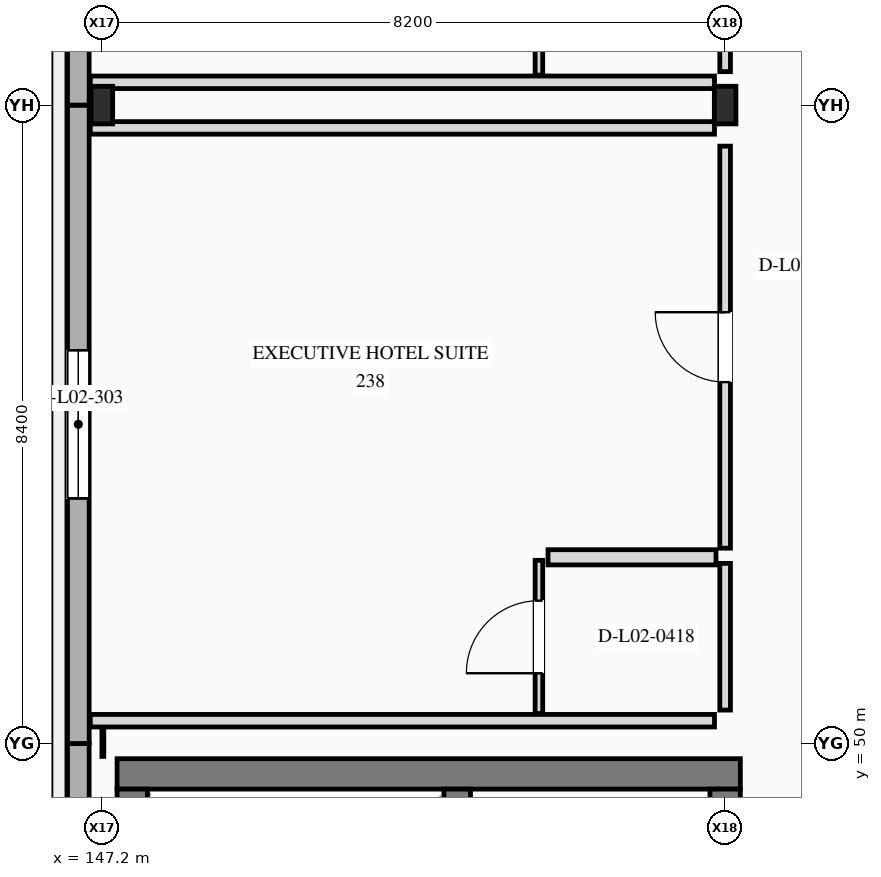
"""IFC4 building model, lengths in metres.
Left out: names, types, materials, properties, quantities, classifications, styles, units other than length and angle.
Written with IfcOpenShell. Run it as: python <this file> out.ifc"""

import sys

from ifc_helpers import new_model, si_unit, direction, frame, frame_2d, origin, origin_2d, place, context, subcontext, project, spatial, rectangle, i_section, extrude, element, fill, save


model = new_model("IFC4")
c1 = context("Model", 3, precision=1e-05, world=origin(), true_north=direction((0.0, 1.0)))
c2 = subcontext(c1, "Body", "Model", "MODEL_VIEW")
j1 = project(units=[si_unit("LENGTHUNIT", "METRE"), si_unit("PLANEANGLEUNIT", "RADIAN")], contexts=[c1])
p1 = place(None, origin())
s1 = spatial("IfcSite", under=j1, at=p1, CompositionType="ELEMENT")
p2 = place(p1, origin())
s2 = spatial("IfcBuilding", under=s1, at=p2, CompositionType="ELEMENT")
p3 = place(p2, frame((0.0, 0.0, 10.8)))
s3 = spatial("IfcBuildingStorey", under=s2, at=p3, CompositionType="ELEMENT", Elevation=10.8)
for number, where, z_axis, x_axis in (
    (1, (147.2, 58.4, 0.0), (0.0, 0.0, 1.0), (1.0, 0.0, 0.0)),
    (2, (155.4, 58.4, 0.0), (0.0, 0.0, 1.0), (1.0, 0.0, 0.0)),
):
    element("IfcColumn", number, at=place(p3, frame(where, z_axis=z_axis, x_axis=x_axis)), inside=s3, PredefinedType="COLUMN", context=c2, shape_type="SweptSolid", body=[
        extrude(i_section(OverallWidth=0.284, OverallDepth=0.495, WebThickness=0.019, FlangeThickness=0.033, at=origin_2d()), origin(), (0.0, 0.0, 1.0), 4.8),
    ])
p4 = place(p3, frame((146.89, 41.6, 0.0), z_axis=(0.0, 0.0, 1.0), x_axis=(0.0, 1.0, 0.0)))
e3 = element("IfcWall", 3, at=p4, inside=s3, PredefinedType="STANDARD", context=c2, shape_type="SweptSolid", body=[
    extrude(rectangle(XDim=8.4, YDim=0.285, at=frame_2d((4.2, 0.0))), origin(), (0.0, 0.0, 1.0), 4.8),
])
p5 = place(p3, frame((146.89, 50.0, 0.0), z_axis=(0.0, 0.0, 1.0), x_axis=(0.0, 1.0, 0.0)))
e4 = element("IfcWall", 4, at=p5, inside=s3, PredefinedType="STANDARD", context=c2, shape_type="SweptSolid", body=[
    extrude(rectangle(XDim=8.4, YDim=0.285, at=frame_2d((4.2, 0.0))), origin(), (0.0, 0.0, 1.0), 4.8),
])
p6 = place(p5, frame((3.225, 0.0, 0.85)))
e5 = element("IfcOpeningElement", 5, at=p6, cuts=e4, PredefinedType="OPENING", context=c2, shape_type="SweptSolid", body=[
    extrude(rectangle(XDim=1.95, YDim=1.85, at=frame_2d((0.975, 0.925))), frame((0.0, 0.152, 0.0), z_axis=(0.0, -1.0, 0.0), x_axis=(1.0, 0.0, 0.0)), (0.0, 0.0, 1.0), 0.305),
])
p7 = place(p3, frame((146.89, 58.4, 0.0), z_axis=(0.0, 0.0, 1.0), x_axis=(0.0, 1.0, 0.0)))
e6 = element("IfcWall", 6, at=p7, inside=s3, PredefinedType="STANDARD", context=c2, shape_type="SweptSolid", body=[
    extrude(rectangle(XDim=8.71, YDim=0.285, at=frame_2d((4.355, 0.0))), origin(), (0.0, 0.0, 1.0), 4.8),
])
p8 = place(p7, frame((3.2, 0.0, 0.85)))
e7 = element("IfcOpeningElement", 7, at=p8, cuts=e6, PredefinedType="OPENING", context=c2, shape_type="SweptSolid", body=[
    extrude(rectangle(XDim=2.0, YDim=1.65, at=frame_2d((1.0, 0.825))), frame((0.0, 0.152, 0.0), z_axis=(0.0, -1.0, 0.0), x_axis=(1.0, 0.0, 0.0)), (0.0, 0.0, 1.0), 0.305),
])
p9 = place(p3, frame((155.6, 49.6, 0.0), z_axis=(0.0, 0.0, 1.0), x_axis=(-1.0, 0.0, 0.0)))
e8 = element("IfcWall", 8, at=p9, inside=s3, PredefinedType="SHEAR", context=c2, shape_type="SweptSolid", body=[
    extrude(rectangle(XDim=8.2, YDim=0.4, at=frame_2d((4.1, 0.0))), origin(), (0.0, 0.0, 1.0), 4.8),
])
p10 = place(p3, frame((147.6, 49.4, 0.0), z_axis=(0.0, 0.0, 1.0), x_axis=(0.0, -1.0, 0.0)))
e9 = element("IfcWall", 9, at=p10, inside=s3, PredefinedType="SHEAR", context=c2, shape_type="SweptSolid", body=[
    extrude(rectangle(XDim=9.4, YDim=0.4, at=frame_2d((4.7, 0.0))), origin(), (0.0, 0.0, 1.0), 4.8),
])
p11 = place(p3, frame((155.4, 40.0, 0.0), z_axis=(0.0, 0.0, 1.0), x_axis=(0.0, 1.0, 0.0)))
e10 = element("IfcWall", 10, at=p11, inside=s3, PredefinedType="SHEAR", context=c2, shape_type="SweptSolid", body=[
    extrude(rectangle(XDim=9.4, YDim=0.4, at=frame_2d((4.7, 0.0))), origin(), (0.0, 0.0, 1.0), 4.8),
])
p12 = place(p11, frame((1.05, 0.0, 0.0)))
e11 = element("IfcOpeningElement", 11, at=p12, cuts=e10, PredefinedType="OPENING", context=c2, shape_type="SweptSolid", body=[
    extrude(rectangle(XDim=1.1, YDim=2.2, at=frame_2d((0.55, 1.1))), frame((0.0, 0.21, 0.0), z_axis=(0.0, -1.0, 0.0), x_axis=(1.0, 0.0, 0.0)), (0.0, 0.0, 1.0), 0.42),
])
p13 = place(p11, frame((3.95, 0.0, 0.0)))
e12 = element("IfcOpeningElement", 12, at=p13, cuts=e10, PredefinedType="OPENING", context=c2, shape_type="SweptSolid", body=[
    extrude(rectangle(XDim=1.1, YDim=2.2, at=frame_2d((0.55, 1.1))), frame((0.0, 0.21, 0.0), z_axis=(0.0, -1.0, 0.0), x_axis=(1.0, 0.0, 0.0)), (0.0, 0.0, 1.0), 0.42),
])
p14 = place(p11, frame((6.875, 0.0, 0.0)))
e13 = element("IfcOpeningElement", 13, at=p14, cuts=e10, PredefinedType="OPENING", context=c2, shape_type="SweptSolid", body=[
    extrude(rectangle(XDim=1.35, YDim=2.3, at=frame_2d((0.675, 1.15))), frame((0.0, 0.21, 0.0), z_axis=(0.0, -1.0, 0.0), x_axis=(1.0, 0.0, 0.0)), (0.0, 0.0, 1.0), 0.42),
])
p15 = place(p3, frame((151.875, 40.0, 0.0), z_axis=(0.0, 0.0, 1.0), x_axis=(0.0, 1.0, 0.0)))
e14 = element("IfcWall", 14, at=p15, inside=s3, PredefinedType="SHEAR", context=c2, shape_type="SweptSolid", body=[
    extrude(rectangle(XDim=9.4, YDim=0.35, at=frame_2d((4.7, 0.0))), origin(), (0.0, 0.0, 1.0), 4.8),
])
p16 = place(p3, frame((155.4, 50.44, 0.0), z_axis=(0.0, 0.0, 1.0), x_axis=(0.0, 1.0, 0.0)))
e15 = element("IfcWall", 15, at=p16, inside=s3, PredefinedType="PARTITIONING", context=c2, shape_type="SweptSolid", body=[
    extrude(rectangle(XDim=1.93, YDim=0.14, at=frame_2d((0.965, 0.0))), origin(), (0.0, 0.0, 1.0), 3.865),
])
p17 = place(p3, frame((155.4, 52.57, 0.0), z_axis=(0.0, 0.0, 1.0), x_axis=(0.0, 1.0, 0.0)))
e16 = element("IfcWall", 16, at=p17, inside=s3, PredefinedType="PARTITIONING", context=c2, shape_type="SweptSolid", body=[
    extrude(rectangle(XDim=5.29, YDim=0.14, at=frame_2d((2.645, 0.0))), origin(), (0.0, 0.0, 1.0), 3.865),
])
p18 = place(p17, frame((2.185, 0.0, 0.0)))
e17 = element("IfcOpeningElement", 17, at=p18, cuts=e16, PredefinedType="OPENING", context=c2, shape_type="SweptSolid", body=[
    extrude(rectangle(XDim=0.92, YDim=2.3, at=frame_2d((0.46, 1.15))), frame((0.0, 0.08, 0.0), z_axis=(0.0, -1.0, 0.0), x_axis=(1.0, 0.0, 0.0)), (0.0, 0.0, 1.0), 0.16),
])
p19 = place(p3, frame((147.048, 50.3, 0.0), z_axis=(0.0, 0.0, 1.0), x_axis=(1.0, 0.0, 0.0)))
e18 = element("IfcWall", 18, at=p19, inside=s3, PredefinedType="PARTITIONING", context=c2, shape_type="SweptSolid", body=[
    extrude(rectangle(XDim=8.212, YDim=0.165, at=frame_2d((4.106, 0.0))), origin(), (0.0, 0.0, 1.0), 4.475),
])
p20 = place(p3, frame((147.048, 58.1, 0.0), z_axis=(0.0, 0.0, 1.0), x_axis=(1.0, 0.0, 0.0)))
e19 = element("IfcWall", 19, at=p20, inside=s3, PredefinedType="PARTITIONING", context=c2, shape_type="SweptSolid", body=[
    extrude(rectangle(XDim=8.212, YDim=0.165, at=frame_2d((4.106, 0.0))), origin(), (0.0, 0.0, 1.0), 3.888),
])
p21 = place(p3, frame((153.07, 52.45, 0.0), z_axis=(0.0, 0.0, 1.0), x_axis=(1.0, 0.0, 0.0)))
e20 = element("IfcWall", 20, at=p21, inside=s3, PredefinedType="PLUMBINGWALL", context=c2, shape_type="SweptSolid", body=[
    extrude(rectangle(XDim=2.21, YDim=0.2, at=frame_2d((1.105, 0.0))), origin(), (0.0, 0.0, 1.0), 4.475),
])
p22 = place(p3, frame((152.95, 50.395, 0.0), z_axis=(0.0, 0.0, 1.0), x_axis=(0.0, 1.0, 0.0)))
e21 = element("IfcWall", 21, at=p22, inside=s3, PredefinedType="PARTITIONING", context=c2, shape_type="SweptSolid", body=[
    extrude(rectangle(XDim=2.015, YDim=0.1, at=frame_2d((1.008, 0.0))), origin(), (0.0, 0.0, 1.0), 4.475),
])
p23 = place(p22, frame((0.53, 0.0, 0.0)))
e22 = element("IfcOpeningElement", 22, at=p23, cuts=e21, PredefinedType="OPENING", context=c2, shape_type="SweptSolid", body=[
    extrude(rectangle(XDim=0.955, YDim=2.22, at=frame_2d((0.478, 1.11))), frame((0.0, 0.06, 0.0), z_axis=(0.0, -1.0, 0.0), x_axis=(1.0, 0.0, 0.0)), (0.0, 0.0, 1.0), 0.12),
])
p24 = place(p3, frame((155.4, 58.84, 0.0), z_axis=(0.0, 0.0, 1.0), x_axis=(0.0, 1.0, 0.0)))
e23 = element("IfcWall", 23, at=p24, inside=s3, PredefinedType="PARTITIONING", context=c2, shape_type="SweptSolid", body=[
    extrude(rectangle(XDim=1.93, YDim=0.14, at=frame_2d((0.965, 0.0))), origin(), (0.0, 0.0, 1.0), 3.949),
])
p25 = place(p3, frame((147.048, 58.7, 0.0), z_axis=(0.0, 0.0, 1.0), x_axis=(1.0, 0.0, 0.0)))
e24 = element("IfcWall", 24, at=p25, inside=s3, PredefinedType="PARTITIONING", context=c2, shape_type="SweptSolid", body=[
    extrude(rectangle(XDim=8.212, YDim=0.165, at=frame_2d((4.106, 0.0))), origin(), (0.0, 0.0, 1.0), 3.888),
])
p26 = place(p3, frame((152.95, 58.794, 0.0), z_axis=(0.0, 0.0, 1.0), x_axis=(0.0, 1.0, 0.0)))
e25 = element("IfcWall", 25, at=p26, inside=s3, PredefinedType="PARTITIONING", context=c2, shape_type="SweptSolid", body=[
    extrude(rectangle(XDim=2.016, YDim=0.1, at=frame_2d((1.008, 0.0))), origin(), (0.0, 0.0, 1.0), 4.083),
])
p27 = place(p26, frame((0.555, 0.0, 0.0)))
e26 = element("IfcOpeningElement", 26, at=p27, cuts=e25, PredefinedType="OPENING", context=c2, shape_type="SweptSolid", body=[
    extrude(rectangle(XDim=0.905, YDim=2.1, at=frame_2d((0.453, 1.05))), frame((0.0, 0.06, 0.0), z_axis=(0.0, -1.0, 0.0), x_axis=(1.0, 0.0, 0.0)), (0.0, 0.0, 1.0), 0.12),
])
p28 = place(p6, origin())
e27 = element("IfcWindow", 27, at=p28, inside=s3, PartitioningType="SINGLE_PANEL", PredefinedType="WINDOW", context=c2, shape_type="SweptSolid", body=[
    extrude(rectangle(XDim=1.95, YDim=1.85, at=frame_2d((0.975, 0.925))), frame((0.0, 0.03, 0.0), z_axis=(0.0, -1.0, 0.0), x_axis=(1.0, 0.0, 0.0)), (0.0, 0.0, 1.0), 0.06),
])
fill(e5, e27)
p29 = place(p18, origin())
e28 = element("IfcDoor", 28, at=p29, inside=s3, OperationType="SINGLE_SWING_RIGHT", PredefinedType="DOOR", context=c2, shape_type="SweptSolid", body=[
    extrude(rectangle(XDim=0.92, YDim=2.3, at=frame_2d((0.46, 1.15))), frame((0.0, 0.025, 0.0), z_axis=(0.0, -1.0, 0.0), x_axis=(1.0, 0.0, 0.0)), (0.0, 0.0, 1.0), 0.05),
])
fill(e17, e28)
p30 = place(p23, origin())
e29 = element("IfcDoor", 29, at=p30, inside=s3, OperationType="SINGLE_SWING_LEFT", PredefinedType="DOOR", context=c2, shape_type="SweptSolid", body=[
    extrude(rectangle(XDim=0.955, YDim=2.22, at=frame_2d((0.478, 1.11))), frame((0.0, 0.025, 0.0), z_axis=(0.0, -1.0, 0.0), x_axis=(1.0, 0.0, 0.0)), (0.0, 0.0, 1.0), 0.05),
])
fill(e22, e29)
save(model, sys.argv[1])
